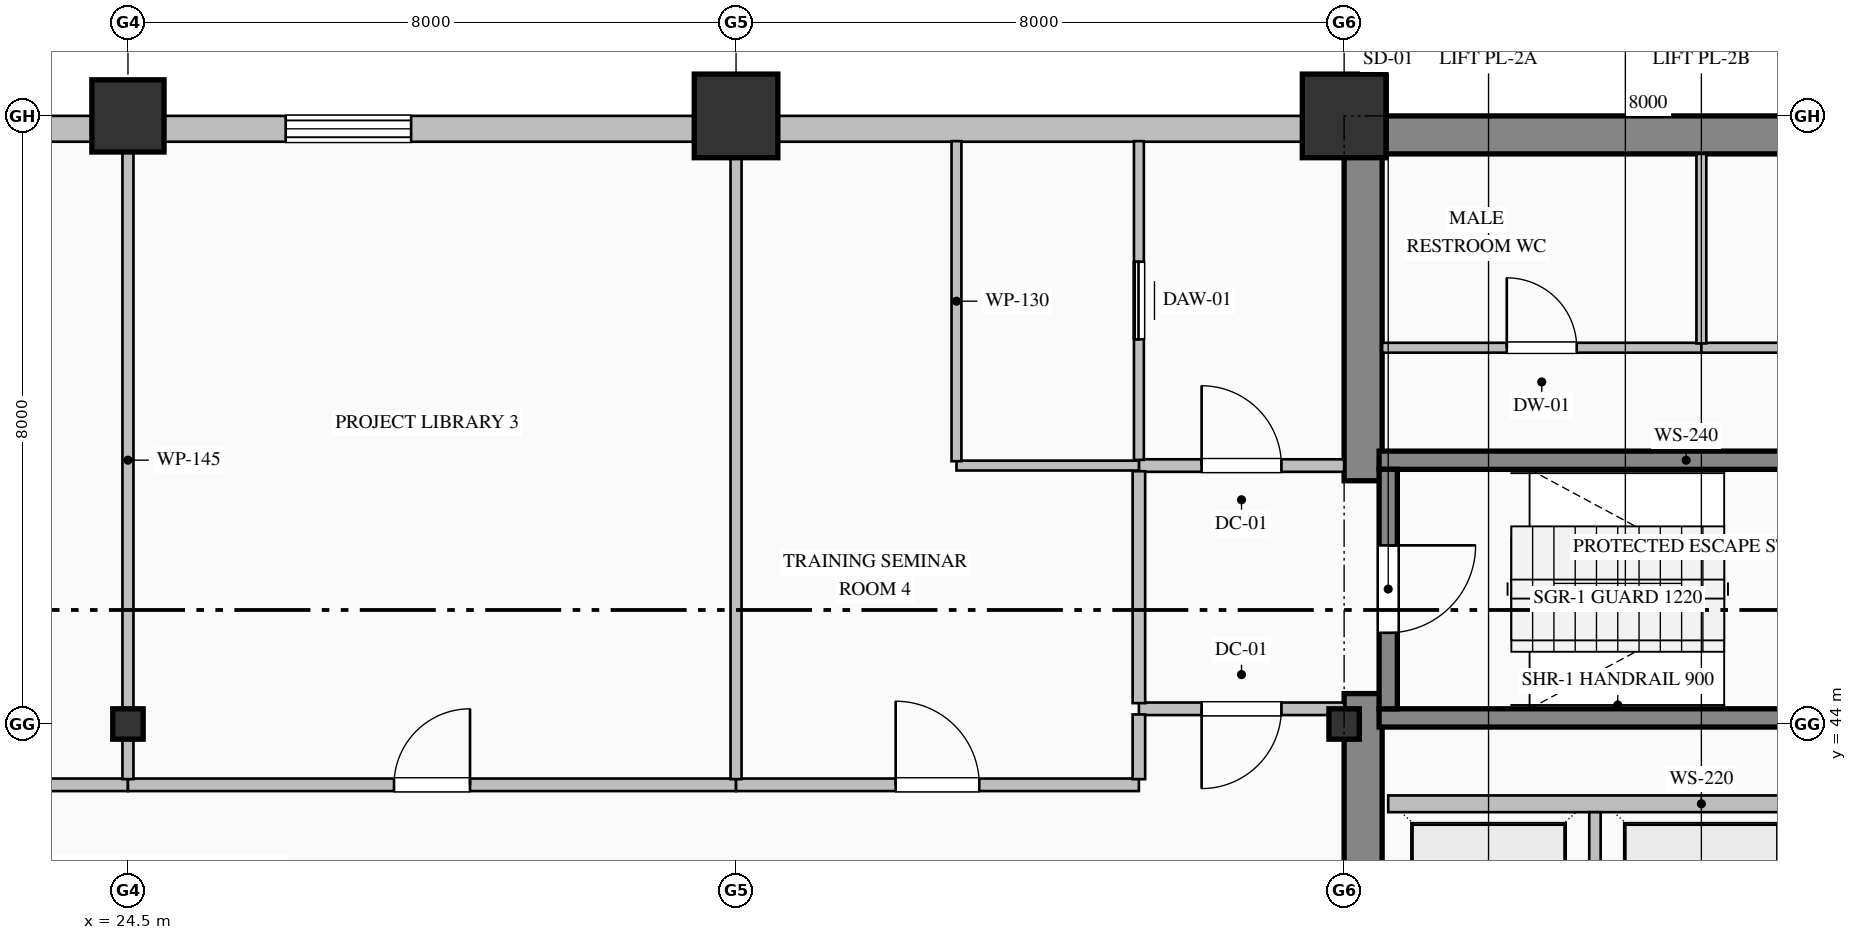
"""IFC4 building model, lengths in metres.
Left out: names, types, materials, properties, quantities, classifications, styles, units other than length and angle.
Written with IfcOpenShell. Run it as: python <this file> out.ifc"""

import sys

from ifc_helpers import new_model, si_unit, direction, frame, frame_2d, origin, origin_2d, place, context, subcontext, project, spatial, rectangle, hollow_rectangle, i_section, extrude, element, fill, save


model = new_model("IFC4")
c1 = context("Model", 3, precision=1e-05, world=origin(), true_north=direction((0.0, 1.0)))
c2 = subcontext(c1, "Body", "Model", "MODEL_VIEW")
j1 = project(units=[si_unit("LENGTHUNIT", "METRE"), si_unit("PLANEANGLEUNIT", "RADIAN")], contexts=[c1])
p1 = place(None, origin())
s1 = spatial("IfcSite", under=j1, at=p1, CompositionType="ELEMENT")
p2 = place(p1, origin())
s2 = spatial("IfcBuilding", under=s1, at=p2, CompositionType="ELEMENT")
p3 = place(p2, frame((0.0, 0.0, 135.0)))
s3 = spatial("IfcBuildingStorey", under=s2, at=p3, CompositionType="ELEMENT", Elevation=135.0)
p4 = place(p3, frame((40.5, 51.75, 0.0), z_axis=(0.0, 0.0, 1.0), x_axis=(1.0, 0.0, 0.0)))
e1 = element("IfcWall", 1, at=p4, inside=s3, PredefinedType="SHEAR", context=c2, shape_type="SweptSolid", body=[
    extrude(rectangle(XDim=23.5, YDim=0.5, at=frame_2d((11.75, 0.0))), origin(), (0.0, 0.0, 1.0), 3.765),
])
p5 = place(p3, frame((40.75, 36.5, 0.0), z_axis=(0.0, 0.0, 1.0), x_axis=(0.0, 1.0, 0.0)))
e2 = element("IfcWall", 2, at=p5, inside=s3, PredefinedType="SHEAR", context=c2, shape_type="SweptSolid", body=[
    extrude(rectangle(XDim=7.9, YDim=0.5, at=frame_2d((3.95, 0.0))), origin(), (0.0, 0.0, 1.0), 3.765),
])
p6 = place(p3, frame((40.75, 47.2, 0.0), z_axis=(0.0, 0.0, 1.0), x_axis=(0.0, 1.0, 0.0)))
e3 = element("IfcWall", 3, at=p6, inside=s3, PredefinedType="SHEAR", context=c2, shape_type="SweptSolid", body=[
    extrude(rectangle(XDim=4.3, YDim=0.5, at=frame_2d((2.15, 0.0))), origin(), (0.0, 0.0, 1.0), 3.765),
])
p7 = place(p3, frame((24.5, 44.0, 0.0), z_axis=(0.0, 0.0, 1.0), x_axis=(1.0, 0.0, 0.0)))
e4 = element("IfcColumn", 4, at=p7, inside=s3, PredefinedType="COLUMN", context=c2, shape_type="SweptSolid", body=[
    extrude(i_section(OverallWidth=0.4, OverallDepth=0.4, WebThickness=0.013, FlangeThickness=0.021, FilletRadius=0.022, at=origin_2d()), origin(), (0.0, 0.0, 1.0), 4.0),
])
p8 = place(p3, frame((24.5, 52.0, 0.0), z_axis=(0.0, 0.0, 1.0), x_axis=(1.0, 0.0, 0.0)))
e5 = element("IfcColumn", 5, at=p8, inside=s3, PredefinedType="COLUMN", context=c2, shape_type="SweptSolid", body=[
    extrude(hollow_rectangle(XDim=0.95, YDim=0.95, WallThickness=0.036, at=origin_2d()), origin(), (0.0, 0.0, 1.0), 4.0),
])
p9 = place(p3, frame((32.5, 52.0, 0.0), z_axis=(0.0, 0.0, 1.0), x_axis=(1.0, 0.0, 0.0)))
e6 = element("IfcColumn", 6, at=p9, inside=s3, PredefinedType="COLUMN", context=c2, shape_type="SweptSolid", body=[
    extrude(hollow_rectangle(XDim=1.1, YDim=1.1, WallThickness=0.04, at=origin_2d()), origin(), (0.0, 0.0, 1.0), 4.0),
])
p10 = place(p3, frame((40.5, 44.0, 0.0), z_axis=(0.0, 0.0, 1.0), x_axis=(1.0, 0.0, 0.0)))
e7 = element("IfcColumn", 7, at=p10, inside=s3, PredefinedType="COLUMN", context=c2, shape_type="SweptSolid", body=[
    extrude(i_section(OverallWidth=0.4, OverallDepth=0.4, WebThickness=0.013, FlangeThickness=0.021, FilletRadius=0.022, at=origin_2d()), origin(), (0.0, 0.0, 1.0), 4.0),
])
p11 = place(p3, frame((40.5, 52.0, 0.0), z_axis=(0.0, 0.0, 1.0), x_axis=(1.0, 0.0, 0.0)))
e8 = element("IfcColumn", 8, at=p11, inside=s3, PredefinedType="COLUMN", context=c2, shape_type="SweptSolid", body=[
    extrude(hollow_rectangle(XDim=1.1, YDim=1.1, WallThickness=0.04, at=origin_2d()), origin(), (0.0, 0.0, 1.0), 4.0),
])
p12 = place(p3, frame((13.0, 51.83, 0.0), z_axis=(0.0, 0.0, 1.0), x_axis=(1.0, 0.0, 0.0)))
e9 = element("IfcWall", 9, at=p12, inside=s3, PredefinedType="SOLIDWALL", context=c2, shape_type="SweptSolid", body=[
    extrude(rectangle(XDim=27.52, YDim=0.34, at=frame_2d((13.76, 0.0))), origin(), (0.0, 0.0, 1.0), 3.265),
])
p13 = place(p12, frame((6.6, 0.0, 0.7)))
e10 = element("IfcOpeningElement", 10, at=p13, cuts=e9, PredefinedType="OPENING", context=c2, shape_type="SweptSolid", body=[
    extrude(rectangle(XDim=1.2, YDim=1.85, at=frame_2d((0.6, 0.925))), frame((0.0, 0.18, 0.0), z_axis=(0.0, -1.0, 0.0), x_axis=(1.0, 0.0, 0.0)), (0.0, 0.0, 1.0), 0.36),
])
p14 = place(p12, frame((13.575, 0.0, 0.85)))
e11 = element("IfcOpeningElement", 11, at=p14, cuts=e9, PredefinedType="OPENING", context=c2, shape_type="SweptSolid", body=[
    extrude(rectangle(XDim=1.65, YDim=1.95, at=frame_2d((0.825, 0.975))), frame((0.0, 0.18, 0.0), z_axis=(0.0, -1.0, 0.0), x_axis=(1.0, 0.0, 0.0)), (0.0, 0.0, 1.0), 0.36),
])
for number, where, z_axis, x_axis in (
    (12, (40.96, 47.47, 0.0), (0.0, 0.0, 1.0), (1.0, 0.0, 0.0)),
    (13, (49.04, 44.08, 0.0), (0.0, 0.0, 1.0), (-1.0, 0.0, 0.0)),
):
    element("IfcWall", number, at=place(p3, frame(where, z_axis=z_axis, x_axis=x_axis)), inside=s3, PredefinedType="SOLIDWALL", context=c2, shape_type="SweptSolid", body=[
        extrude(rectangle(XDim=8.08, YDim=0.24, at=frame_2d((4.04, 0.0))), origin(), (0.0, 0.0, 1.0), 4.0),
    ])
p15 = place(p3, frame((41.08, 47.35, 0.0), z_axis=(0.0, 0.0, 1.0), x_axis=(0.0, -1.0, 0.0)))
e14 = element("IfcWall", 14, at=p15, inside=s3, PredefinedType="SOLIDWALL", context=c2, shape_type="SweptSolid", body=[
    extrude(rectangle(XDim=3.15, YDim=0.24, at=frame_2d((1.575, 0.0))), origin(), (0.0, 0.0, 1.0), 4.0),
])
p16 = place(p15, frame((1.0, 0.0, 0.0)))
e15 = element("IfcOpeningElement", 15, at=p16, cuts=e14, PredefinedType="OPENING", context=c2, shape_type="SweptSolid", body=[
    extrude(rectangle(XDim=1.15, YDim=2.2, at=frame_2d((0.575, 1.1))), frame((0.0, 0.13, 0.0), z_axis=(0.0, -1.0, 0.0), x_axis=(1.0, 0.0, 0.0)), (0.0, 0.0, 1.0), 0.26),
])
p17 = place(p3, frame((41.08, 42.95, 0.0), z_axis=(0.0, 0.0, 1.0), x_axis=(1.0, 0.0, 0.0)))
e16 = element("IfcWall", 16, at=p17, inside=s3, PredefinedType="PARTITIONING", context=c2, shape_type="SweptSolid", body=[
    extrude(rectangle(XDim=8.24, YDim=0.22, at=frame_2d((4.12, 0.0))), origin(), (0.0, 0.0, 1.0), 3.765),
])
p18 = place(p3, frame((43.8, 40.76, 0.0), z_axis=(0.0, 0.0, 1.0), x_axis=(0.0, 1.0, 0.0)))
e17 = element("IfcWall", 17, at=p18, inside=s3, PredefinedType="PARTITIONING", context=c2, shape_type="SweptSolid", body=[
    extrude(rectangle(XDim=2.08, YDim=0.15, at=frame_2d((1.04, 0.0))), origin(), (0.0, 0.0, 1.0), 3.765),
])
p19 = place(p3, frame((37.8, 47.4, 0.0), z_axis=(0.0, 0.0, 1.0), x_axis=(1.0, 0.0, 0.0)))
e18 = element("IfcWall", 18, at=p19, inside=s3, PredefinedType="PARTITIONING", context=c2, shape_type="SweptSolid", body=[
    extrude(rectangle(XDim=2.7, YDim=0.165, at=frame_2d((1.35, 0.0))), origin(), (0.0, 0.0, 1.0), 3.765),
])
p20 = place(p19, frame((0.825, 0.0, 0.0)))
e19 = element("IfcOpeningElement", 19, at=p20, cuts=e18, PredefinedType="OPENING", context=c2, shape_type="SweptSolid", body=[
    extrude(rectangle(XDim=1.05, YDim=2.15, at=frame_2d((0.525, 1.075))), frame((0.0, 0.093, 0.0), z_axis=(0.0, -1.0, 0.0), x_axis=(1.0, 0.0, 0.0)), (0.0, 0.0, 1.0), 0.185),
])
p21 = place(p3, frame((40.5, 44.2, 0.0), z_axis=(0.0, 0.0, 1.0), x_axis=(-1.0, 0.0, 0.0)))
e20 = element("IfcWall", 20, at=p21, inside=s3, PredefinedType="PARTITIONING", context=c2, shape_type="SweptSolid", body=[
    extrude(rectangle(XDim=2.7, YDim=0.165, at=frame_2d((1.35, 0.0))), origin(), (0.0, 0.0, 1.0), 3.765),
])
p22 = place(p21, frame((0.825, 0.0, 0.0)))
e21 = element("IfcOpeningElement", 21, at=p22, cuts=e20, PredefinedType="OPENING", context=c2, shape_type="SweptSolid", body=[
    extrude(rectangle(XDim=1.05, YDim=2.15, at=frame_2d((0.525, 1.075))), frame((0.0, 0.093, 0.0), z_axis=(0.0, -1.0, 0.0), x_axis=(1.0, 0.0, 0.0)), (0.0, 0.0, 1.0), 0.185),
])
p23 = place(p3, frame((37.8, 44.274, 0.0), z_axis=(0.0, 0.0, 1.0), x_axis=(0.0, 1.0, 0.0)))
e22 = element("IfcWall", 22, at=p23, inside=s3, PredefinedType="PARTITIONING", context=c2, shape_type="SweptSolid", body=[
    extrude(rectangle(XDim=3.051, YDim=0.165, at=frame_2d((1.525, 0.0))), origin(), (0.0, 0.0, 1.0), 3.765),
])
p24 = place(p3, frame((37.8, 47.475, 0.0), z_axis=(0.0, 0.0, 1.0), x_axis=(0.0, 1.0, 0.0)))
e23 = element("IfcWall", 23, at=p24, inside=s3, PredefinedType="PARTITIONING", context=c2, shape_type="SweptSolid", body=[
    extrude(rectangle(XDim=4.193, YDim=0.13, at=frame_2d((2.097, 0.0))), origin(), (0.0, 0.0, 1.0), 3.765),
])
p25 = place(p24, frame((1.587, 0.0, 0.0)))
e24 = element("IfcOpeningElement", 24, at=p25, cuts=e23, PredefinedType="OPENING", context=c2, shape_type="SweptSolid", body=[
    extrude(rectangle(XDim=1.02, YDim=2.15, at=frame_2d((0.51, 1.075))), frame((0.0, 0.075, 0.0), z_axis=(0.0, -1.0, 0.0), x_axis=(1.0, 0.0, 0.0)), (0.0, 0.0, 1.0), 0.15),
])
p26 = place(p3, frame((37.8, 47.4, 0.0), z_axis=(0.0, 0.0, 1.0), x_axis=(-1.0, 0.0, 0.0)))
e25 = element("IfcWall", 25, at=p26, inside=s3, PredefinedType="PARTITIONING", context=c2, shape_type="SweptSolid", body=[
    extrude(rectangle(XDim=2.4, YDim=0.13, at=frame_2d((1.2, 0.0))), origin(), (0.0, 0.0, 1.0), 3.765),
])
p27 = place(p3, frame((35.4, 47.457, 0.0), z_axis=(0.0, 0.0, 1.0), x_axis=(0.0, 1.0, 0.0)))
e26 = element("IfcWall", 26, at=p27, inside=s3, PredefinedType="PARTITIONING", context=c2, shape_type="SweptSolid", body=[
    extrude(rectangle(XDim=4.211, YDim=0.13, at=frame_2d((2.105, 0.0))), origin(), (0.0, 0.0, 1.0), 3.765),
])
p28 = place(p3, frame((41.0, 48.95, 0.0), z_axis=(0.0, 0.0, 1.0), x_axis=(1.0, 0.0, 0.0)))
e27 = element("IfcWall", 27, at=p28, inside=s3, PredefinedType="PARTITIONING", context=c2, shape_type="SweptSolid", body=[
    extrude(rectangle(XDim=4.2, YDim=0.13, at=frame_2d((2.1, 0.0))), origin(), (0.0, 0.0, 1.0), 3.765),
])
p29 = place(p28, frame((1.64, 0.0, 0.0)))
e28 = element("IfcOpeningElement", 28, at=p29, cuts=e27, PredefinedType="OPENING", context=c2, shape_type="SweptSolid", body=[
    extrude(rectangle(XDim=0.92, YDim=2.15, at=frame_2d((0.46, 1.075))), frame((0.0, 0.075, 0.0), z_axis=(0.0, -1.0, 0.0), x_axis=(1.0, 0.0, 0.0)), (0.0, 0.0, 1.0), 0.15),
])
p30 = place(p3, frame((45.2, 48.95, 0.0), z_axis=(0.0, 0.0, 1.0), x_axis=(1.0, 0.0, 0.0)))
e29 = element("IfcWall", 29, at=p30, inside=s3, PredefinedType="PARTITIONING", context=c2, shape_type="SweptSolid", body=[
    extrude(rectangle(XDim=4.018, YDim=0.13, at=frame_2d((2.009, 0.0))), origin(), (0.0, 0.0, 1.0), 3.765),
])
p31 = place(p30, frame((1.549, 0.0, 0.0)))
e30 = element("IfcOpeningElement", 30, at=p31, cuts=e29, PredefinedType="OPENING", context=c2, shape_type="SweptSolid", body=[
    extrude(rectangle(XDim=0.92, YDim=2.15, at=frame_2d((0.46, 1.075))), frame((0.0, 0.075, 0.0), z_axis=(0.0, -1.0, 0.0), x_axis=(1.0, 0.0, 0.0)), (0.0, 0.0, 1.0), 0.15),
])
p32 = place(p3, frame((45.2, 51.5, 0.0), z_axis=(0.0, 0.0, 1.0), x_axis=(0.0, -1.0, 0.0)))
e31 = element("IfcWall", 31, at=p32, inside=s3, PredefinedType="PARTITIONING", context=c2, shape_type="SweptSolid", body=[
    extrude(rectangle(XDim=2.493, YDim=0.13, at=frame_2d((1.247, 0.0))), origin(), (0.0, 0.0, 1.0), 3.765),
])
p33 = place(p3, frame((16.5, 43.2, 0.0), z_axis=(0.0, 0.0, 1.0), x_axis=(1.0, 0.0, 0.0)))
e32 = element("IfcWall", 32, at=p33, inside=s3, PredefinedType="PARTITIONING", context=c2, shape_type="SweptSolid", body=[
    extrude(rectangle(XDim=8.0, YDim=0.165, at=frame_2d((4.0, 0.0))), origin(), (0.0, 0.0, 1.0), 3.765),
])
p34 = place(p33, frame((3.45, 0.0, 0.0)))
e33 = element("IfcOpeningElement", 33, at=p34, cuts=e32, PredefinedType="OPENING", context=c2, shape_type="SweptSolid", body=[
    extrude(rectangle(XDim=1.1, YDim=2.2, at=frame_2d((0.55, 1.1))), frame((0.0, 0.093, 0.0), z_axis=(0.0, -1.0, 0.0), x_axis=(1.0, 0.0, 0.0)), (0.0, 0.0, 1.0), 0.185),
])
p35 = place(p3, frame((24.5, 43.2, 0.0), z_axis=(0.0, 0.0, 1.0), x_axis=(1.0, 0.0, 0.0)))
e34 = element("IfcWall", 34, at=p35, inside=s3, PredefinedType="PARTITIONING", context=c2, shape_type="SweptSolid", body=[
    extrude(rectangle(XDim=8.0, YDim=0.165, at=frame_2d((4.0, 0.0))), origin(), (0.0, 0.0, 1.0), 3.765),
])
p36 = place(p35, frame((3.5, 0.0, 0.0)))
e35 = element("IfcOpeningElement", 35, at=p36, cuts=e34, PredefinedType="OPENING", context=c2, shape_type="SweptSolid", body=[
    extrude(rectangle(XDim=1.0, YDim=2.15, at=frame_2d((0.5, 1.075))), frame((0.0, 0.093, 0.0), z_axis=(0.0, -1.0, 0.0), x_axis=(1.0, 0.0, 0.0)), (0.0, 0.0, 1.0), 0.185),
])
p37 = place(p3, frame((32.5, 43.2, 0.0), z_axis=(0.0, 0.0, 1.0), x_axis=(1.0, 0.0, 0.0)))
e36 = element("IfcWall", 36, at=p37, inside=s3, PredefinedType="PARTITIONING", context=c2, shape_type="SweptSolid", body=[
    extrude(rectangle(XDim=5.3, YDim=0.165, at=frame_2d((2.65, 0.0))), origin(), (0.0, 0.0, 1.0), 3.765),
])
p38 = place(p37, frame((2.1, 0.0, 0.0)))
e37 = element("IfcOpeningElement", 37, at=p38, cuts=e36, PredefinedType="OPENING", context=c2, shape_type="SweptSolid", body=[
    extrude(rectangle(XDim=1.1, YDim=2.2, at=frame_2d((0.55, 1.1))), frame((0.0, 0.093, 0.0), z_axis=(0.0, -1.0, 0.0), x_axis=(1.0, 0.0, 0.0)), (0.0, 0.0, 1.0), 0.185),
])
p39 = place(p3, frame((37.8, 43.274, 0.0), z_axis=(0.0, 0.0, 1.0), x_axis=(0.0, 1.0, 0.0)))
e38 = element("IfcWall", 38, at=p39, inside=s3, PredefinedType="PARTITIONING", context=c2, shape_type="SweptSolid", body=[
    extrude(rectangle(XDim=0.851, YDim=0.165, at=frame_2d((0.426, 0.0))), origin(), (0.0, 0.0, 1.0), 3.765),
])
p40 = place(p3, frame((24.5, 51.668, 0.0), z_axis=(0.0, 0.0, 1.0), x_axis=(0.0, -1.0, 0.0)))
e39 = element("IfcWall", 39, at=p40, inside=s3, PredefinedType="PARTITIONING", context=c2, shape_type="SweptSolid", body=[
    extrude(rectangle(XDim=8.394, YDim=0.145, at=frame_2d((4.197, 0.0))), origin(), (0.0, 0.0, 1.0), 3.157),
])
p41 = place(p3, frame((32.5, 51.668, 0.0), z_axis=(0.0, 0.0, 1.0), x_axis=(0.0, -1.0, 0.0)))
e40 = element("IfcWall", 40, at=p41, inside=s3, PredefinedType="PARTITIONING", context=c2, shape_type="SweptSolid", body=[
    extrude(rectangle(XDim=8.394, YDim=0.145, at=frame_2d((4.197, 0.0))), origin(), (0.0, 0.0, 1.0), 3.765),
])
p42 = place(p14, origin())
e41 = element("IfcWindow", 41, at=p42, inside=s3, PartitioningType="DOUBLE_PANEL_VERTICAL", PredefinedType="WINDOW", context=c2, shape_type="SweptSolid", body=[
    extrude(rectangle(XDim=1.65, YDim=1.95, at=frame_2d((0.825, 0.975))), frame((0.0, 0.15, 0.0), z_axis=(0.0, -1.0, 0.0), x_axis=(1.0, 0.0, 0.0)), (0.0, 0.0, 1.0), 0.06),
])
fill(e11, e41)
p43 = place(p16, origin())
e42 = element("IfcDoor", 42, at=p43, inside=s3, OperationType="SINGLE_SWING_LEFT", PredefinedType="DOOR", context=c2, shape_type="SweptSolid", body=[
    extrude(rectangle(XDim=1.15, YDim=2.2, at=frame_2d((0.575, 1.1))), frame((0.0, 0.025, 0.0), z_axis=(0.0, -1.0, 0.0), x_axis=(1.0, 0.0, 0.0)), (0.0, 0.0, 1.0), 0.05),
])
fill(e15, e42)
p44 = place(p20, origin())
e43 = element("IfcDoor", 43, at=p44, inside=s3, OperationType="SINGLE_SWING_LEFT", PredefinedType="DOOR", context=c2, shape_type="SweptSolid", body=[
    extrude(rectangle(XDim=1.05, YDim=2.15, at=frame_2d((0.525, 1.075))), frame((0.0, 0.025, 0.0), z_axis=(0.0, -1.0, 0.0), x_axis=(1.0, 0.0, 0.0)), (0.0, 0.0, 1.0), 0.05),
])
fill(e19, e43)
p45 = place(p22, origin())
e44 = element("IfcDoor", 44, at=p45, inside=s3, OperationType="SINGLE_SWING_RIGHT", PredefinedType="DOOR", context=c2, shape_type="SweptSolid", body=[
    extrude(rectangle(XDim=1.05, YDim=2.15, at=frame_2d((0.525, 1.075))), frame((0.0, 0.025, 0.0), z_axis=(0.0, -1.0, 0.0), x_axis=(1.0, 0.0, 0.0)), (0.0, 0.0, 1.0), 0.05),
])
fill(e21, e44)
p46 = place(p25, origin())
e45 = element("IfcDoor", 45, at=p46, inside=s3, OperationType="SLIDING_TO_LEFT", PredefinedType="DOOR", context=c2, shape_type="SweptSolid", body=[
    extrude(rectangle(XDim=1.02, YDim=2.15, at=frame_2d((0.51, 1.075))), frame((0.0, 0.025, 0.0), z_axis=(0.0, -1.0, 0.0), x_axis=(1.0, 0.0, 0.0)), (0.0, 0.0, 1.0), 0.05),
])
fill(e24, e45)
p47 = place(p29, origin())
e46 = element("IfcDoor", 46, at=p47, inside=s3, OperationType="SINGLE_SWING_LEFT", PredefinedType="DOOR", context=c2, shape_type="SweptSolid", body=[
    extrude(rectangle(XDim=0.92, YDim=2.15, at=frame_2d((0.46, 1.075))), frame((0.0, 0.025, 0.0), z_axis=(0.0, -1.0, 0.0), x_axis=(1.0, 0.0, 0.0)), (0.0, 0.0, 1.0), 0.05),
])
fill(e28, e46)
p48 = place(p36, origin())
e47 = element("IfcDoor", 47, at=p48, inside=s3, OperationType="SINGLE_SWING_RIGHT", PredefinedType="DOOR", context=c2, shape_type="SweptSolid", body=[
    extrude(rectangle(XDim=1.0, YDim=2.15, at=frame_2d((0.5, 1.075))), frame((0.0, 0.025, 0.0), z_axis=(0.0, -1.0, 0.0), x_axis=(1.0, 0.0, 0.0)), (0.0, 0.0, 1.0), 0.05),
])
fill(e35, e47)
p49 = place(p38, origin())
e48 = element("IfcDoor", 48, at=p49, inside=s3, OperationType="SINGLE_SWING_LEFT", PredefinedType="DOOR", context=c2, shape_type="SweptSolid", body=[
    extrude(rectangle(XDim=1.1, YDim=2.2, at=frame_2d((0.55, 1.1))), frame((0.0, 0.025, 0.0), z_axis=(0.0, -1.0, 0.0), x_axis=(1.0, 0.0, 0.0)), (0.0, 0.0, 1.0), 0.05),
])
fill(e37, e48)
save(model, sys.argv[1])
